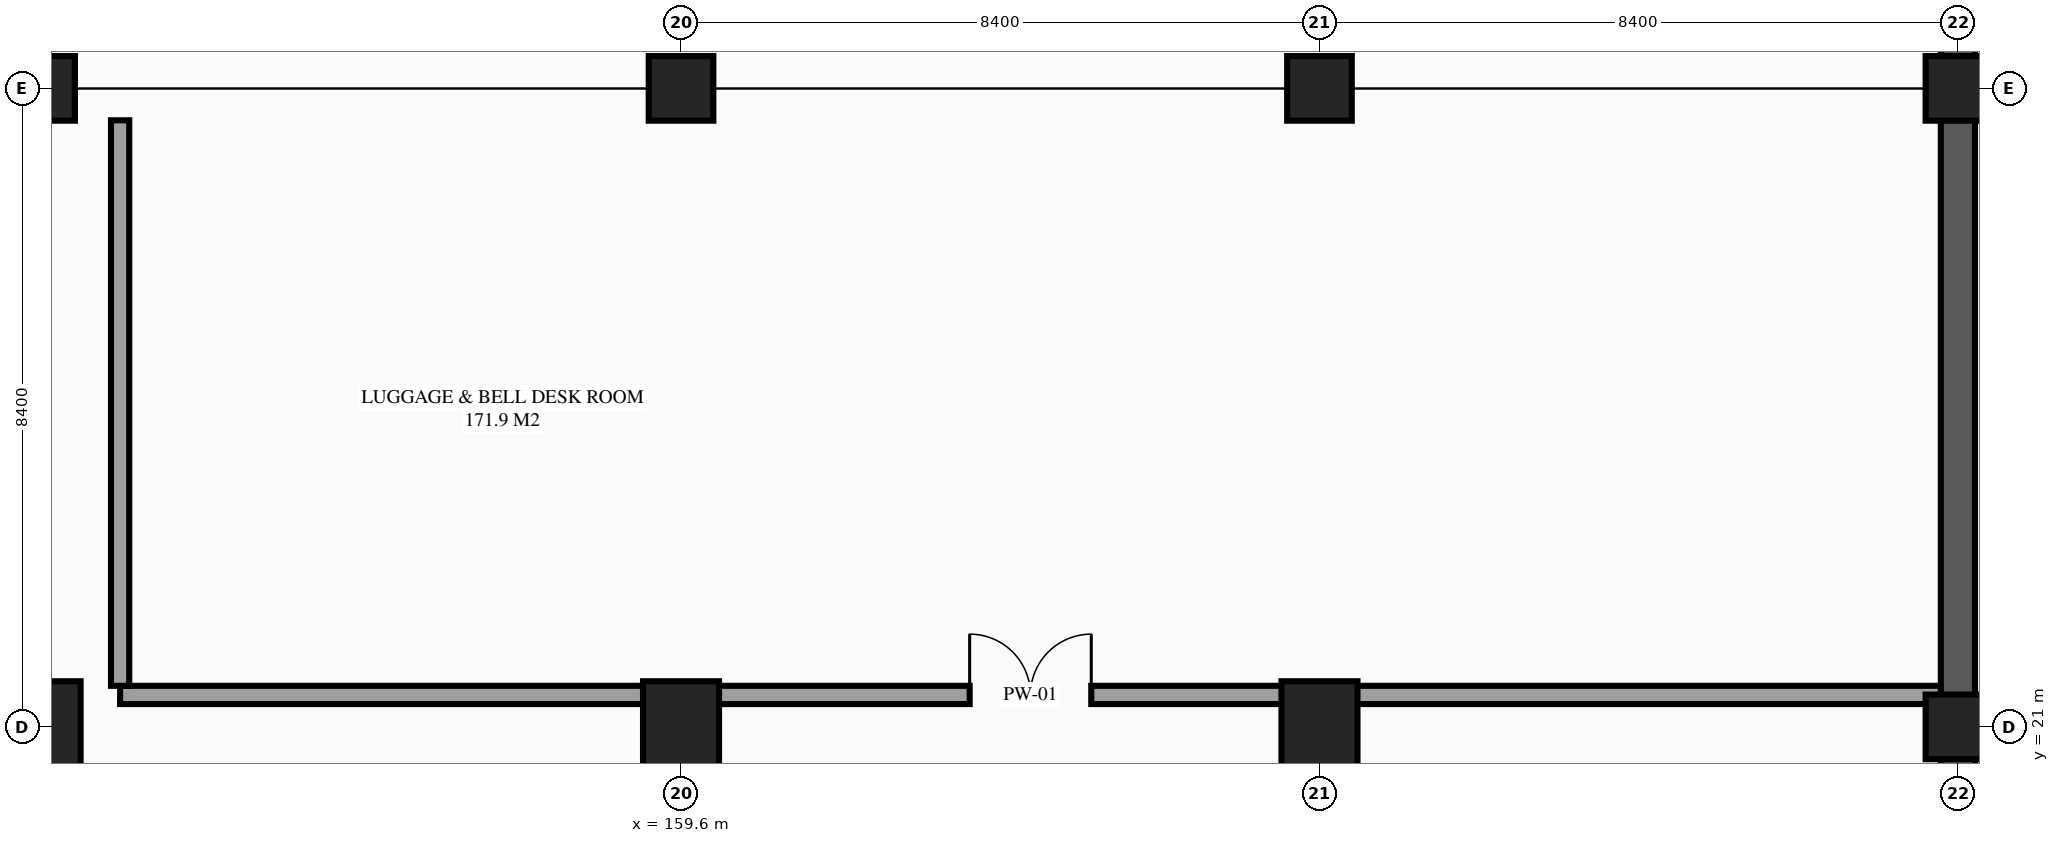
"""IFC4 building model, lengths in metres.
Left out: names, types, materials, properties, quantities, classifications, styles, units other than length and angle.
Written with IfcOpenShell. Run it as: python <this file> out.ifc"""

import sys

from ifc_helpers import new_model, si_unit, direction, frame, frame_2d, origin, origin_2d, place, context, subcontext, project, spatial, rectangle, extrude, element, fill, save


model = new_model("IFC4")
c1 = context("Model", 3, precision=1e-05, world=origin(), true_north=direction((0.0, 1.0)))
c2 = subcontext(c1, "Body", "Model", "MODEL_VIEW")
j1 = project(units=[si_unit("LENGTHUNIT", "METRE"), si_unit("PLANEANGLEUNIT", "RADIAN")], contexts=[c1])
p1 = place(None, origin())
s1 = spatial("IfcSite", under=j1, at=p1, CompositionType="ELEMENT")
p2 = place(p1, origin())
s2 = spatial("IfcBuilding", under=s1, at=p2, CompositionType="ELEMENT")
p3 = place(p2, origin())
s3 = spatial("IfcBuildingStorey", under=s2, at=p3, CompositionType="ELEMENT", Elevation=0.0)
p4 = place(p3, frame((151.2, 21.0, 0.0), z_axis=(0.0, 0.0, 1.0), x_axis=(1.0, 0.0, 0.0)))
e1 = element("IfcColumn", 1, at=p4, inside=s3, PredefinedType="COLUMN", context=c2, shape_type="SweptSolid", body=[
    extrude(rectangle(XDim=1.0, YDim=1.2, at=origin_2d()), origin(), (0.0, 0.0, 1.0), 5.4),
])
p5 = place(p3, frame((151.2, 29.4, 0.0), z_axis=(0.0, 0.0, 1.0), x_axis=(1.0, 0.0, 0.0)))
e2 = element("IfcColumn", 2, at=p5, inside=s3, PredefinedType="COLUMN", context=c2, shape_type="SweptSolid", body=[
    extrude(rectangle(XDim=0.85, YDim=0.85, at=origin_2d()), origin(), (0.0, 0.0, 1.0), 5.4),
])
p6 = place(p3, frame((159.6, 21.0, 0.0), z_axis=(0.0, 0.0, 1.0), x_axis=(1.0, 0.0, 0.0)))
e3 = element("IfcColumn", 3, at=p6, inside=s3, PredefinedType="COLUMN", context=c2, shape_type="SweptSolid", body=[
    extrude(rectangle(XDim=1.0, YDim=1.2, at=origin_2d()), origin(), (0.0, 0.0, 1.0), 5.4),
])
p7 = place(p3, frame((159.6, 29.4, 0.0), z_axis=(0.0, 0.0, 1.0), x_axis=(1.0, 0.0, 0.0)))
e4 = element("IfcColumn", 4, at=p7, inside=s3, PredefinedType="COLUMN", context=c2, shape_type="SweptSolid", body=[
    extrude(rectangle(XDim=0.85, YDim=0.85, at=origin_2d()), origin(), (0.0, 0.0, 1.0), 5.4),
])
p8 = place(p3, frame((168.0, 21.0, 0.0), z_axis=(0.0, 0.0, 1.0), x_axis=(1.0, 0.0, 0.0)))
e5 = element("IfcColumn", 5, at=p8, inside=s3, PredefinedType="COLUMN", context=c2, shape_type="SweptSolid", body=[
    extrude(rectangle(XDim=1.0, YDim=1.2, at=origin_2d()), origin(), (0.0, 0.0, 1.0), 5.4),
])
for number, where, z_axis, x_axis in (
    (6, (168.0, 29.4, 0.0), (0.0, 0.0, 1.0), (1.0, 0.0, 0.0)),
    (7, (176.4, 21.0, 0.0), (0.0, 0.0, 1.0), (1.0, 0.0, 0.0)),
    (8, (176.4, 29.4, 0.0), (0.0, 0.0, 1.0), (1.0, 0.0, 0.0)),
):
    element("IfcColumn", number, at=place(p3, frame(where, z_axis=z_axis, x_axis=x_axis)), inside=s3, PredefinedType="COLUMN", context=c2, shape_type="SweptSolid", body=[
        extrude(rectangle(XDim=0.85, YDim=0.85, at=origin_2d()), origin(), (0.0, 0.0, 1.0), 5.4),
    ])
for number, where, z_axis, x_axis in (
    (9, (176.4, 12.6, 0.0), (0.0, 0.0, 1.0), (0.0, 1.0, 0.0)),
    (10, (176.4, 21.0, 0.0), (0.0, 0.0, 1.0), (0.0, 1.0, 0.0)),
):
    element("IfcWall", number, at=place(p3, frame(where, z_axis=z_axis, x_axis=x_axis)), inside=s3, PredefinedType="STANDARD", context=c2, shape_type="SweptSolid", body=[
        extrude(rectangle(XDim=8.4, YDim=0.45, at=frame_2d((4.2, 0.0))), origin(), (0.0, 0.0, 1.0), 5.4),
    ])
p9 = place(p3, frame((176.4, 29.4, 0.0), z_axis=(0.0, 0.0, 1.0), x_axis=(0.0, 1.0, 0.0)))
e11 = element("IfcWall", 11, at=p9, inside=s3, PredefinedType="STANDARD", context=c2, shape_type="SweptSolid", body=[
    extrude(rectangle(XDim=8.4, YDim=0.45, at=frame_2d((4.2, 0.0))), origin(), (0.0, 0.0, 1.0), 5.4),
])
p10 = place(p3, frame((152.22, 21.42, 0.0), z_axis=(0.0, 0.0, 1.0), x_axis=(1.0, 0.0, 0.0)))
e12 = element("IfcWall", 12, at=p10, inside=s3, PredefinedType="PARTITIONING", context=c2, shape_type="SweptSolid", body=[
    extrude(rectangle(XDim=23.955, YDim=0.24, at=frame_2d((11.978, 0.0))), origin(), (0.0, 0.0, 1.0), 5.135),
])
p11 = place(p10, frame((11.177, 0.0, 0.0)))
e13 = element("IfcOpeningElement", 13, at=p11, cuts=e12, PredefinedType="OPENING", context=c2, shape_type="SweptSolid", body=[
    extrude(rectangle(XDim=1.6, YDim=2.25, at=frame_2d((0.8, 1.125))), frame((0.0, 0.13, 0.0), z_axis=(0.0, -1.0, 0.0), x_axis=(1.0, 0.0, 0.0)), (0.0, 0.0, 1.0), 0.26),
])
p12 = place(p3, frame((152.22, 21.54, 0.0), z_axis=(0.0, 0.0, 1.0), x_axis=(0.0, 1.0, 0.0)))
e14 = element("IfcWall", 14, at=p12, inside=s3, PredefinedType="PARTITIONING", context=c2, shape_type="SweptSolid", body=[
    extrude(rectangle(XDim=7.44, YDim=0.24, at=frame_2d((3.72, 0.0))), origin(), (0.0, 0.0, 1.0), 5.135),
])
p13 = place(p11, origin())
e15 = element("IfcDoor", 15, at=p13, inside=s3, OperationType="DOUBLE_DOOR_SINGLE_SWING", PredefinedType="DOOR", context=c2, shape_type="SweptSolid", body=[
    extrude(rectangle(XDim=1.6, YDim=2.25, at=frame_2d((0.8, 1.125))), frame((0.0, 0.025, 0.0), z_axis=(0.0, -1.0, 0.0), x_axis=(1.0, 0.0, 0.0)), (0.0, 0.0, 1.0), 0.05),
])
fill(e13, e15)
save(model, sys.argv[1])
